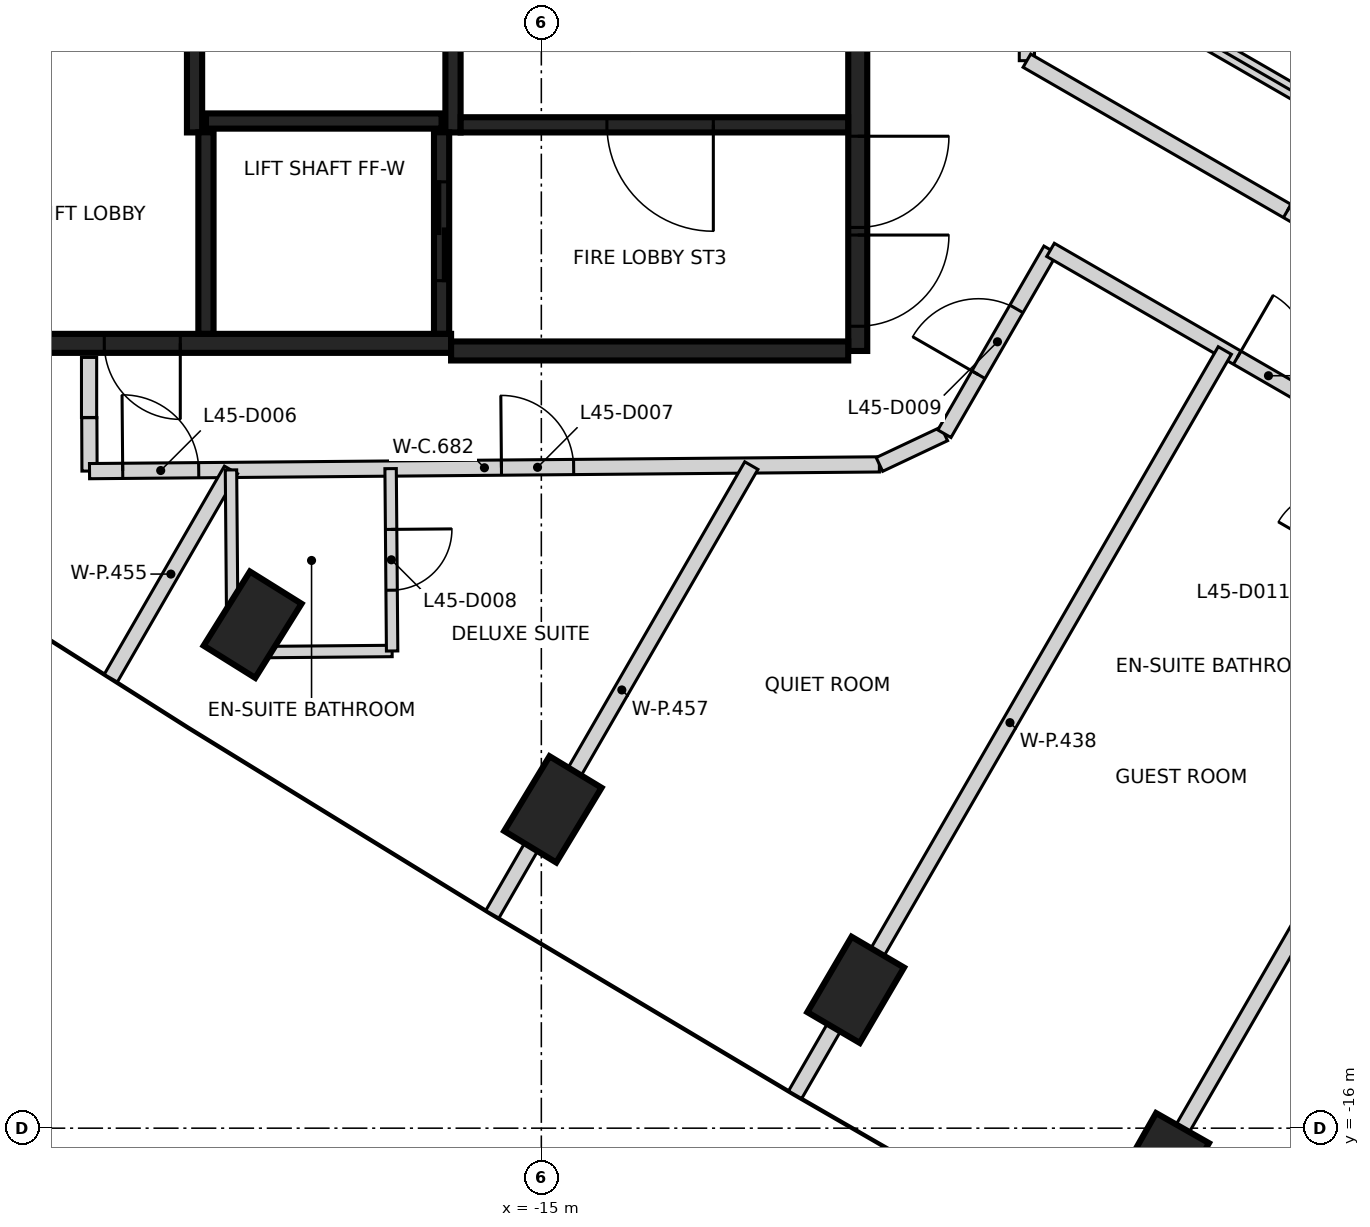
"""IFC4 building model, lengths in metres.
Left out: names, types, materials, properties, quantities, classifications, styles, units other than length and angle.
Written with IfcOpenShell. Run it as: python <this file> out.ifc"""

import sys

from ifc_helpers import new_model, si_unit, direction, frame, frame_2d, origin, origin_2d, place, context, subcontext, project, spatial, rectangle, extrude, element, fill, save


model = new_model("IFC4")
c1 = context("Model", 3, precision=1e-05, world=origin(), true_north=direction((0.0, 1.0)))
c2 = subcontext(c1, "Body", "Model", "MODEL_VIEW")
j1 = project(units=[si_unit("LENGTHUNIT", "METRE"), si_unit("PLANEANGLEUNIT", "RADIAN")], contexts=[c1])
p1 = place(None, origin())
s1 = spatial("IfcSite", under=j1, at=p1, CompositionType="ELEMENT")
p2 = place(p1, origin())
s2 = spatial("IfcBuilding", under=s1, at=p2, CompositionType="ELEMENT")
p3 = place(p2, frame((0.0, 0.0, 182.8)))
s3 = spatial("IfcBuildingStorey", under=s2, at=p3, CompositionType="ELEMENT", Elevation=182.8)
for number, where, z_axis, x_axis in (
    (1, (-18.799, -9.376, -0.35), (0.0, 0.0, 1.0), (0.529, 0.848, 0.0)),
    (2, (-14.848, -11.806, -0.35), (0.0, 0.0, 1.0), (0.518, 0.855, 0.0)),
    (3, (-10.864, -14.18, -0.35), (0.0, 0.0, 1.0), (0.506, 0.862, 0.0)),
    (4, (-6.848, -16.499, -0.35), (0.0, 0.0, 1.0), (0.494, 0.87, 0.0)),
):
    element("IfcColumn", number, at=place(p3, frame(where, z_axis=z_axis, x_axis=x_axis)), inside=s3, PredefinedType="COLUMN", context=c2, shape_type="SweptSolid", body=[
        extrude(rectangle(XDim=1.15, YDim=0.8, at=origin_2d()), origin(), (0.0, 0.0, 1.0), 3.6),
    ])
p4 = place(p3, frame((-10.837, 5.775, 0.0), z_axis=(0.0, 0.0, 1.0), x_axis=(0.0, -1.0, 0.0)))
e5 = element("IfcWall", 5, at=p4, inside=s3, PredefinedType="SHEAR", context=c2, shape_type="SweptSolid", body=[
    extrude(rectangle(XDim=11.55, YDim=0.25, at=frame_2d((5.775, 0.0))), origin(), (0.0, 0.0, 1.0), 3.25),
])
p5 = place(p4, frame((10.025, 0.0, 0.0)))
e6 = element("IfcOpeningElement", 6, at=p5, cuts=e5, PredefinedType="OPENING", context=c2, shape_type="SweptSolid", body=[
    extrude(rectangle(XDim=1.2, YDim=2.1, at=frame_2d((0.6, 1.05))), frame((0.0, 0.135, 0.0), z_axis=(0.0, -1.0, 0.0), x_axis=(1.0, 0.0, 0.0)), (0.0, 0.0, 1.0), 0.27),
])
p6 = place(p4, frame((8.725, 0.0, 0.0)))
e7 = element("IfcOpeningElement", 7, at=p6, cuts=e5, PredefinedType="OPENING", context=c2, shape_type="SweptSolid", body=[
    extrude(rectangle(XDim=1.2, YDim=2.1, at=frame_2d((0.6, 1.05))), frame((0.0, 0.135, 0.0), z_axis=(0.0, -1.0, 0.0), x_axis=(1.0, 0.0, 0.0)), (0.0, 0.0, 1.0), 0.27),
])
p7 = place(p3, frame((-16.187, -5.675, 0.0), z_axis=(0.0, 0.0, 1.0), x_axis=(-1.0, 0.0, 0.0)))
e8 = element("IfcWall", 8, at=p7, inside=s3, PredefinedType="SHEAR", context=c2, shape_type="SweptSolid", body=[
    extrude(rectangle(XDim=6.125, YDim=0.25, at=frame_2d((3.062, 0.0))), origin(), (0.0, 0.0, 1.0), 3.25),
])
p8 = place(p7, frame((3.563, 0.0, 0.0)))
e9 = element("IfcOpeningElement", 9, at=p8, cuts=e8, PredefinedType="OPENING", context=c2, shape_type="SweptSolid", body=[
    extrude(rectangle(XDim=1.0, YDim=2.1, at=frame_2d((0.5, 1.05))), frame((0.0, 0.135, 0.0), z_axis=(0.0, -1.0, 0.0), x_axis=(1.0, 0.0, 0.0)), (0.0, 0.0, 1.0), 0.27),
])
p9 = place(p3, frame((-10.963, -5.775, 0.0), z_axis=(0.0, 0.0, 1.0), x_axis=(-1.0, 0.0, 0.0)))
e10 = element("IfcWall", 10, at=p9, inside=s3, PredefinedType="SHEAR", context=c2, shape_type="SweptSolid", body=[
    extrude(rectangle(XDim=5.225, YDim=0.25, at=frame_2d((2.612, 0.0))), origin(), (0.0, 0.0, 1.0), 3.25),
])
p10 = place(p3, frame((-16.162, 3.074, 0.0), z_axis=(0.0, 0.0, 1.0), x_axis=(0.0, -1.0, 0.0)))
e11 = element("IfcWall", 11, at=p10, inside=s3, PredefinedType="SHEAR", context=c2, shape_type="SweptSolid", body=[
    extrude(rectangle(XDim=5.974, YDim=0.2, at=frame_2d((2.987, 0.0))), origin(), (0.0, 0.0, 1.0), 3.25),
])
p11 = place(p3, frame((-19.562, -2.9, 0.0), z_axis=(0.0, 0.0, 1.0), x_axis=(0.0, 1.0, 0.0)))
e12 = element("IfcWall", 12, at=p11, inside=s3, PredefinedType="SHEAR", context=c2, shape_type="SweptSolid", body=[
    extrude(rectangle(XDim=6.1, YDim=0.2, at=frame_2d((3.05, 0.0))), origin(), (0.0, 0.0, 1.0), 3.25),
])
p12 = place(p3, frame((-10.963, -2.8, 0.0), z_axis=(0.0, 0.0, 1.0), x_axis=(-1.0, 0.0, 0.0)))
e13 = element("IfcWall", 13, at=p12, inside=s3, PredefinedType="SHEAR", context=c2, shape_type="SweptSolid", body=[
    extrude(rectangle(XDim=5.098, YDim=0.2, at=frame_2d((2.549, 0.0))), origin(), (0.0, 0.0, 1.0), 3.25),
])
p13 = place(p12, frame((1.774, 0.0, 0.0)))
e14 = element("IfcOpeningElement", 14, at=p13, cuts=e13, PredefinedType="OPENING", context=c2, shape_type="SweptSolid", body=[
    extrude(rectangle(XDim=1.4, YDim=2.1, at=frame_2d((0.7, 1.05))), frame((0.0, 0.11, 0.0), z_axis=(0.0, -1.0, 0.0), x_axis=(1.0, 0.0, 0.0)), (0.0, 0.0, 1.0), 0.22),
])
p14 = place(p3, frame((-19.412, -2.75, 0.0), z_axis=(0.0, 0.0, 1.0), x_axis=(1.0, 0.0, 0.0)))
e15 = element("IfcWall", 15, at=p14, inside=s3, PredefinedType="SHEAR", context=c2, shape_type="SweptSolid", body=[
    extrude(rectangle(XDim=3.1, YDim=0.2, at=frame_2d((1.55, 0.0))), origin(), (0.0, 0.0, 1.0), 3.25),
])
p15 = place(p3, frame((-16.312, -2.898, 0.0), z_axis=(0.0, 0.0, 1.0), x_axis=(0.0, -1.0, 0.0)))
e16 = element("IfcWall", 16, at=p15, inside=s3, PredefinedType="SHEAR", context=c2, shape_type="SweptSolid", body=[
    extrude(rectangle(XDim=2.651, YDim=0.2, at=frame_2d((1.325, 0.0))), origin(), (0.0, 0.0, 1.0), 3.25),
])
p16 = place(p15, frame((0.652, 0.0, 0.0)))
e17 = element("IfcOpeningElement", 17, at=p16, cuts=e16, PredefinedType="OPENING", context=c2, shape_type="SweptSolid", body=[
    extrude(rectangle(XDim=1.3, YDim=2.1, at=frame_2d((0.65, 1.05))), frame((0.0, 0.11, 0.0), z_axis=(0.0, -1.0, 0.0), x_axis=(1.0, 0.0, 0.0)), (0.0, 0.0, 1.0), 0.22),
])
p17 = place(p3, frame((-19.412, -5.549, 0.0), z_axis=(0.0, 0.0, 1.0), x_axis=(0.0, 1.0, 0.0)))
e18 = element("IfcWall", 18, at=p17, inside=s3, PredefinedType="SHEAR", context=c2, shape_type="SweptSolid", body=[
    extrude(rectangle(XDim=2.651, YDim=0.2, at=frame_2d((1.325, 0.0))), origin(), (0.0, 0.0, 1.0), 3.25),
])
p18 = place(p3, frame((-20.95, -6.65, 0.0), z_axis=(0.0, 0.0, 1.0), x_axis=(0.0, 1.0, 0.0)))
e19 = element("IfcWall", 19, at=p18, inside=s3, PredefinedType="PARTITIONING", context=c2, shape_type="SweptSolid", body=[
    extrude(rectangle(XDim=0.79, YDim=0.2, at=frame_2d((0.395, 0.0))), origin(), (0.0, 0.0, 1.0), 3.25),
])
p19 = place(p3, frame((-20.947, -6.653, 0.0), z_axis=(0.0, 0.0, 1.0), x_axis=(0.004173876686, -0.999991289339, 0.0)))
e20 = element("IfcWall", 20, at=p19, inside=s3, PredefinedType="PARTITIONING", context=c2, shape_type="SweptSolid", body=[
    extrude(rectangle(XDim=0.702, YDim=0.2, at=frame_2d((0.351, 0.0))), origin(), (0.0, 0.0, 1.0), 3.25),
])
p20 = place(p3, frame((-20.944, -7.356, 0.0), z_axis=(0.0, 0.0, 1.0), x_axis=(0.999963632327, 0.008528424382, 0.0)))
e21 = element("IfcWall", 21, at=p20, inside=s3, PredefinedType="PARTITIONING", context=c2, shape_type="SweptSolid", body=[
    extrude(rectangle(XDim=10.392, YDim=0.2, at=frame_2d((5.196, 0.0))), origin(), (0.0, 0.0, 1.0), 3.25),
])
p21 = place(p20, frame((0.437, 0.0, 0.0)))
e22 = element("IfcOpeningElement", 22, at=p21, cuts=e21, PredefinedType="OPENING", context=c2, shape_type="SweptSolid", body=[
    extrude(rectangle(XDim=1.0, YDim=2.1, at=frame_2d((0.5, 1.05))), frame((0.0, 0.11, 0.0), z_axis=(0.0, -1.0, 0.0), x_axis=(1.0, 0.0, 0.0)), (0.0, 0.0, 1.0), 0.22),
])
p22 = place(p20, frame((5.419, 0.0, 0.0)))
e23 = element("IfcOpeningElement", 23, at=p22, cuts=e21, PredefinedType="OPENING", context=c2, shape_type="SweptSolid", body=[
    extrude(rectangle(XDim=0.95, YDim=2.1, at=frame_2d((0.475, 1.05))), frame((0.0, 0.11, 0.0), z_axis=(0.0, -1.0, 0.0), x_axis=(1.0, 0.0, 0.0)), (0.0, 0.0, 1.0), 0.22),
])
p23 = place(p3, frame((-10.552, -7.268, 0.0), z_axis=(0.0, 0.0, 1.0), x_axis=(0.904331815333, 0.426830139255, 0.0)))
e24 = element("IfcWall", 24, at=p23, inside=s3, PredefinedType="PARTITIONING", context=c2, shape_type="SweptSolid", body=[
    extrude(rectangle(XDim=0.944, YDim=0.2, at=frame_2d((0.472, 0.0))), origin(), (0.0, 0.0, 1.0), 3.25),
])
p24 = place(p3, frame((-9.697, -6.864, 0.0), z_axis=(0.0, 0.0, 1.0), x_axis=(0.499843530644, 0.866115722564, 0.0)))
e25 = element("IfcWall", 25, at=p24, inside=s3, PredefinedType="PARTITIONING", context=c2, shape_type="SweptSolid", body=[
    extrude(rectangle(XDim=2.793, YDim=0.2, at=frame_2d((1.396, 0.0))), origin(), (0.0, 0.0, 1.0), 3.25),
])
p25 = place(p24, frame((0.896, 0.0, 0.0)))
e26 = element("IfcOpeningElement", 26, at=p25, cuts=e25, PredefinedType="OPENING", context=c2, shape_type="SweptSolid", body=[
    extrude(rectangle(XDim=1.0, YDim=2.1, at=frame_2d((0.5, 1.05))), frame((0.0, 0.11, 0.0), z_axis=(0.0, -1.0, 0.0), x_axis=(1.0, 0.0, 0.0)), (0.0, 0.0, 1.0), 0.22),
])
p26 = place(p3, frame((-8.612, -1.956, 0.0), z_axis=(0.0, 0.0, 1.0), x_axis=(0.0, 1.0, 0.0)))
e27 = element("IfcWall", 27, at=p26, inside=s3, PredefinedType="PARTITIONING", context=c2, shape_type="SweptSolid", body=[
    extrude(rectangle(XDim=0.974, YDim=0.2, at=frame_2d((0.487, 0.0))), origin(), (0.0, 0.0, 1.0), 3.25),
])
p27 = place(p3, frame((-8.612, -1.956, 0.0), z_axis=(0.0, 0.0, 1.0), x_axis=(0.866034386606, -0.499984440973, 0.0)))
e28 = element("IfcWall", 28, at=p27, inside=s3, PredefinedType="PARTITIONING", context=c2, shape_type="SweptSolid", body=[
    extrude(rectangle(XDim=12.96, YDim=0.2, at=frame_2d((6.48, 0.0))), origin(), (0.0, 0.0, 1.0), 3.25),
])
p28 = place(p27, frame((3.955, 0.0, 0.0)))
e29 = element("IfcOpeningElement", 29, at=p28, cuts=e28, PredefinedType="OPENING", context=c2, shape_type="SweptSolid", body=[
    extrude(rectangle(XDim=0.9, YDim=2.1, at=frame_2d((0.45, 1.05))), frame((0.0, 0.11, 0.0), z_axis=(0.0, -1.0, 0.0), x_axis=(1.0, 0.0, 0.0)), (0.0, 0.0, 1.0), 0.22),
])
p29 = place(p27, frame((10.424, 0.0, 0.0)))
e30 = element("IfcOpeningElement", 30, at=p29, cuts=e28, PredefinedType="OPENING", context=c2, shape_type="SweptSolid", body=[
    extrude(rectangle(XDim=0.9, YDim=2.1, at=frame_2d((0.45, 1.05))), frame((0.0, 0.11, 0.0), z_axis=(0.0, -1.0, 0.0), x_axis=(1.0, 0.0, 0.0)), (0.0, 0.0, 1.0), 0.22),
])
p30 = place(p3, frame((-8.301, -4.445, 0.0), z_axis=(0.0, 0.0, 1.0), x_axis=(0.865969859016, -0.500096194023, 0.0)))
e31 = element("IfcWall", 31, at=p30, inside=s3, PredefinedType="PARTITIONING", context=c2, shape_type="SweptSolid", body=[
    extrude(rectangle(XDim=12.647, YDim=0.2, at=frame_2d((6.323, 0.0))), origin(), (0.0, 0.0, 1.0), 3.25),
])
p31 = place(p30, frame((2.836, 0.0, 0.0)))
e32 = element("IfcOpeningElement", 32, at=p31, cuts=e31, PredefinedType="OPENING", context=c2, shape_type="SweptSolid", body=[
    extrude(rectangle(XDim=0.95, YDim=2.1, at=frame_2d((0.475, 1.05))), frame((0.0, 0.11, 0.0), z_axis=(0.0, -1.0, 0.0), x_axis=(1.0, 0.0, 0.0)), (0.0, 0.0, 1.0), 0.22),
])
p32 = place(p30, frame((11.467, 0.0, 0.0)))
e33 = element("IfcOpeningElement", 33, at=p32, cuts=e31, PredefinedType="OPENING", context=c2, shape_type="SweptSolid", body=[
    extrude(rectangle(XDim=0.95, YDim=2.1, at=frame_2d((0.475, 1.05))), frame((0.0, 0.11, 0.0), z_axis=(0.0, -1.0, 0.0), x_axis=(1.0, 0.0, 0.0)), (0.0, 0.0, 1.0), 0.22),
])
p33 = place(p3, frame((-20.664, -10.081, 0.0), z_axis=(0.0, 0.0, 1.0), x_axis=(0.499782572363, 0.866150899302, 0.0)))
e34 = element("IfcWall", 34, at=p33, inside=s3, PredefinedType="PARTITIONING", context=c2, shape_type="SweptSolid", body=[
    extrude(rectangle(XDim=3.164, YDim=0.2, at=frame_2d((1.582, 0.0))), origin(), (0.0, 0.0, 1.0), 2.35),
])
p34 = place(p3, frame((-15.645, -13.187, 0.0), z_axis=(0.0, 0.0, 1.0), x_axis=(0.499921913572, 0.866070482311, 0.0)))
e35 = element("IfcWall", 35, at=p34, inside=s3, PredefinedType="PARTITIONING", context=c2, shape_type="SweptSolid", body=[
    extrude(rectangle(XDim=6.816, YDim=0.2, at=frame_2d((3.408, 0.0))), origin(), (0.0, 0.0, 1.0), 3.25),
])
p35 = place(p3, frame((-11.661, -15.561, 0.0), z_axis=(0.0, 0.0, 1.0), x_axis=(0.500012795616, 0.866018016106, 0.0)))
e36 = element("IfcWall", 36, at=p35, inside=s3, PredefinedType="PARTITIONING", context=c2, shape_type="SweptSolid", body=[
    extrude(rectangle(XDim=11.306, YDim=0.2, at=frame_2d((5.653, 0.0))), origin(), (0.0, 0.0, 1.0), 3.25),
])
p36 = place(p3, frame((-7.6, -0.924, 0.0), z_axis=(0.0, 0.0, 1.0), x_axis=(0.866028806638, -0.499994106039, 0.0)))
e37 = element("IfcWall", 37, at=p36, inside=s3, PredefinedType="PARTITIONING", context=c2, shape_type="SweptSolid", body=[
    extrude(rectangle(XDim=12.24, YDim=0.2, at=frame_2d((6.12, 0.0))), origin(), (0.0, 0.0, 1.0), 3.25),
])
p37 = place(p3, frame((-7.646, -17.879, 0.0), z_axis=(0.0, 0.0, 1.0), x_axis=(0.500031496802, 0.866007218334, 0.0)))
e38 = element("IfcWall", 38, at=p37, inside=s3, PredefinedType="PARTITIONING", context=c2, shape_type="SweptSolid", body=[
    extrude(rectangle(XDim=11.306, YDim=0.2, at=frame_2d((5.653, 0.0))), origin(), (0.0, 0.0, 1.0), 3.25),
])
p38 = place(p3, frame((-19.083, -7.34, 0.0), z_axis=(0.0, 0.0, 1.0), x_axis=(0.008341520563, -0.999965208912, 0.0)))
e39 = element("IfcWall", 39, at=p38, inside=s3, PredefinedType="PARTITIONING", context=c2, shape_type="SweptSolid", body=[
    extrude(rectangle(XDim=2.4, YDim=0.15, at=frame_2d((1.2, 0.0))), origin(), (0.0, 0.0, 1.0), 3.25),
])
p39 = place(p3, frame((-19.063, -9.74, 0.0), z_axis=(0.0, 0.0, 1.0), x_axis=(0.999962999255, 0.008602332242, 0.0)))
e40 = element("IfcWall", 40, at=p39, inside=s3, PredefinedType="PARTITIONING", context=c2, shape_type="SweptSolid", body=[
    extrude(rectangle(XDim=2.1, YDim=0.15, at=frame_2d((1.05, 0.0))), origin(), (0.0, 0.0, 1.0), 2.35),
])
p40 = place(p3, frame((-16.983, -7.323, 0.0), z_axis=(0.0, 0.0, 1.0), x_axis=(0.00834491602, -0.999965180582, 0.0)))
e41 = element("IfcWall", 41, at=p40, inside=s3, PredefinedType="PARTITIONING", context=c2, shape_type="SweptSolid", body=[
    extrude(rectangle(XDim=2.399, YDim=0.15, at=frame_2d((1.199, 0.0))), origin(), (0.0, 0.0, 1.0), 3.25),
])
p41 = place(p40, frame((0.8, 0.0, 0.0)))
e42 = element("IfcOpeningElement", 42, at=p41, cuts=e41, PredefinedType="OPENING", context=c2, shape_type="SweptSolid", body=[
    extrude(rectangle(XDim=0.8, YDim=2.1, at=frame_2d((0.4, 1.05))), frame((0.0, 0.085, 0.0), z_axis=(0.0, -1.0, 0.0), x_axis=(1.0, 0.0, 0.0)), (0.0, 0.0, 1.0), 0.17),
])
p42 = place(p16, origin())
e43 = element("IfcDoor", 43, at=p42, inside=s3, OperationType="SLIDING_TO_RIGHT", PredefinedType="DOOR", context=c2, shape_type="SweptSolid", body=[
    extrude(rectangle(XDim=1.3, YDim=2.1, at=frame_2d((0.65, 1.05))), frame((0.0, 0.025, 0.0), z_axis=(0.0, -1.0, 0.0), x_axis=(1.0, 0.0, 0.0)), (0.0, 0.0, 1.0), 0.05),
])
fill(e17, e43)
p43 = place(p8, origin())
e44 = element("IfcDoor", 44, at=p43, inside=s3, OperationType="SINGLE_SWING_LEFT", PredefinedType="DOOR", context=c2, shape_type="SweptSolid", body=[
    extrude(rectangle(XDim=1.0, YDim=2.1, at=frame_2d((0.5, 1.05))), frame((0.0, 0.025, 0.0), z_axis=(0.0, -1.0, 0.0), x_axis=(1.0, 0.0, 0.0)), (0.0, 0.0, 1.0), 0.05),
])
fill(e9, e44)
p44 = place(p5, origin())
e45 = element("IfcDoor", 45, at=p44, inside=s3, OperationType="SINGLE_SWING_LEFT", PredefinedType="DOOR", context=c2, shape_type="SweptSolid", body=[
    extrude(rectangle(XDim=1.2, YDim=2.1, at=frame_2d((0.6, 1.05))), frame((0.0, 0.025, 0.0), z_axis=(0.0, -1.0, 0.0), x_axis=(1.0, 0.0, 0.0)), (0.0, 0.0, 1.0), 0.05),
])
fill(e6, e45)
p45 = place(p6, origin())
e46 = element("IfcDoor", 46, at=p45, inside=s3, OperationType="SINGLE_SWING_RIGHT", PredefinedType="DOOR", context=c2, shape_type="SweptSolid", body=[
    extrude(rectangle(XDim=1.2, YDim=2.1, at=frame_2d((0.6, 1.05))), frame((0.0, 0.025, 0.0), z_axis=(0.0, -1.0, 0.0), x_axis=(1.0, 0.0, 0.0)), (0.0, 0.0, 1.0), 0.05),
])
fill(e7, e46)
p46 = place(p13, origin())
e47 = element("IfcDoor", 47, at=p46, inside=s3, OperationType="SINGLE_SWING_RIGHT", PredefinedType="DOOR", context=c2, shape_type="SweptSolid", body=[
    extrude(rectangle(XDim=1.4, YDim=2.1, at=frame_2d((0.7, 1.05))), frame((0.0, 0.025, 0.0), z_axis=(0.0, -1.0, 0.0), x_axis=(1.0, 0.0, 0.0)), (0.0, 0.0, 1.0), 0.05),
])
fill(e14, e47)
p47 = place(p21, origin())
e48 = element("IfcDoor", 48, at=p47, inside=s3, OperationType="SINGLE_SWING_LEFT", PredefinedType="DOOR", context=c2, shape_type="SweptSolid", body=[
    extrude(rectangle(XDim=1.0, YDim=2.1, at=frame_2d((0.5, 1.05))), frame((0.0, 0.025, 0.0), z_axis=(0.0, -1.0, 0.0), x_axis=(1.0, 0.0, 0.0)), (0.0, 0.0, 1.0), 0.05),
])
fill(e22, e48)
p48 = place(p22, frame((0.95, 0.0, 0.0), z_axis=(0.0, 0.0, 1.0), x_axis=(-1.0, 0.0, 0.0)))
e49 = element("IfcDoor", 49, at=p48, inside=s3, OperationType="SINGLE_SWING_LEFT", PredefinedType="DOOR", context=c2, shape_type="SweptSolid", body=[
    extrude(rectangle(XDim=0.95, YDim=2.1, at=frame_2d((0.475, 1.05))), frame((0.0, 0.025, 0.0), z_axis=(0.0, -1.0, 0.0), x_axis=(1.0, 0.0, 0.0)), (0.0, 0.0, 1.0), 0.05),
])
fill(e23, e49)
p49 = place(p41, frame((0.8, 0.0, 0.0), z_axis=(0.0, 0.0, 1.0), x_axis=(-1.0, 0.0, 0.0)))
e50 = element("IfcDoor", 50, at=p49, inside=s3, OperationType="SINGLE_SWING_LEFT", PredefinedType="DOOR", context=c2, shape_type="SweptSolid", body=[
    extrude(rectangle(XDim=0.8, YDim=2.1, at=frame_2d((0.4, 1.05))), frame((0.0, 0.025, 0.0), z_axis=(0.0, -1.0, 0.0), x_axis=(1.0, 0.0, 0.0)), (0.0, 0.0, 1.0), 0.05),
])
fill(e42, e50)
p50 = place(p25, frame((1.0, 0.0, 0.0), z_axis=(0.0, 0.0, 1.0), x_axis=(-1.0, 0.0, 0.0)))
e51 = element("IfcDoor", 51, at=p50, inside=s3, OperationType="SINGLE_SWING_LEFT", PredefinedType="DOOR", context=c2, shape_type="SweptSolid", body=[
    extrude(rectangle(XDim=1.0, YDim=2.1, at=frame_2d((0.5, 1.05))), frame((0.0, 0.025, 0.0), z_axis=(0.0, -1.0, 0.0), x_axis=(1.0, 0.0, 0.0)), (0.0, 0.0, 1.0), 0.05),
])
fill(e26, e51)
p51 = place(p31, frame((0.95, 0.0, 0.0), z_axis=(0.0, 0.0, 1.0), x_axis=(-1.0, 0.0, 0.0)))
e52 = element("IfcDoor", 52, at=p51, inside=s3, OperationType="SINGLE_SWING_LEFT", PredefinedType="DOOR", context=c2, shape_type="SweptSolid", body=[
    extrude(rectangle(XDim=0.95, YDim=2.1, at=frame_2d((0.475, 1.05))), frame((0.0, 0.025, 0.0), z_axis=(0.0, -1.0, 0.0), x_axis=(1.0, 0.0, 0.0)), (0.0, 0.0, 1.0), 0.05),
])
fill(e32, e52)
p52 = place(p28, origin())
e53 = element("IfcDoor", 53, at=p52, inside=s3, OperationType="SINGLE_SWING_LEFT", PredefinedType="DOOR", context=c2, shape_type="SweptSolid", body=[
    extrude(rectangle(XDim=0.9, YDim=2.1, at=frame_2d((0.45, 1.05))), frame((0.0, 0.025, 0.0), z_axis=(0.0, -1.0, 0.0), x_axis=(1.0, 0.0, 0.0)), (0.0, 0.0, 1.0), 0.05),
])
fill(e29, e53)
save(model, sys.argv[1])
